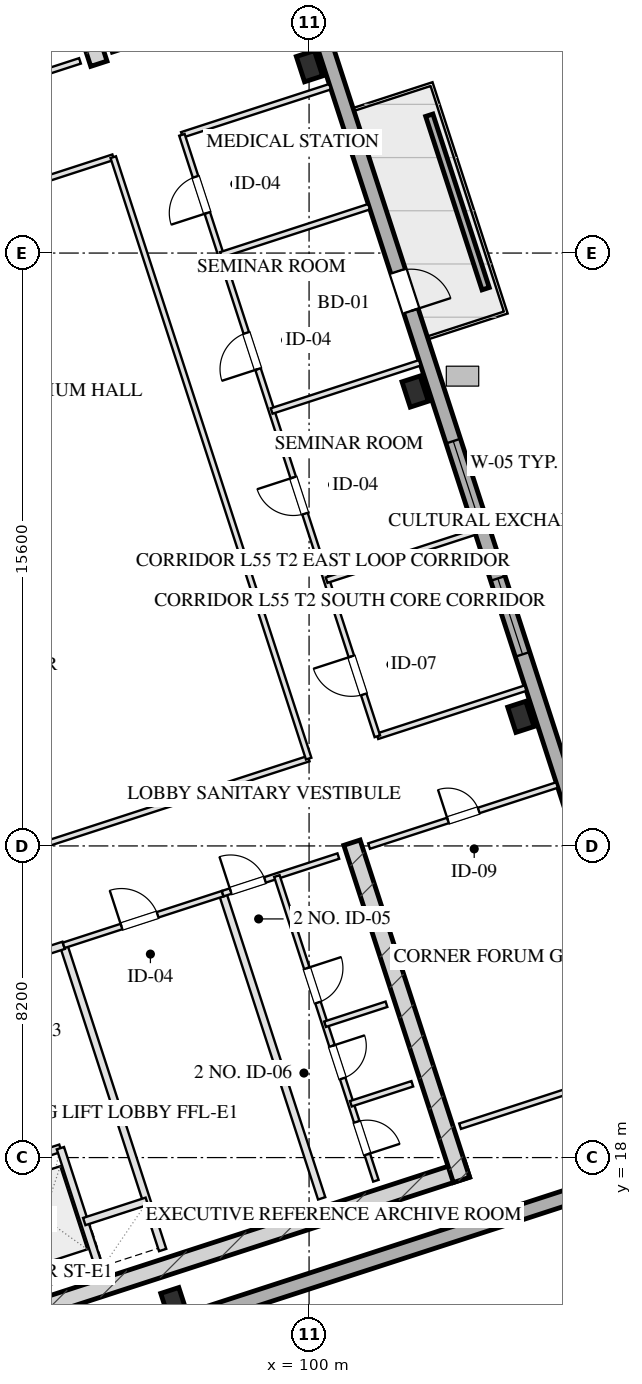
"""IFC4 building model, lengths in metres.
Left out: names, types, materials, properties, quantities, classifications, styles, units other than length and angle.
Written with IfcOpenShell. Run it as: python <this file> out.ifc"""

import sys

from ifc_helpers import new_model, si_unit, direction, frame, frame_2d, origin, origin_2d, place, context, subcontext, project, spatial, rectangle, hollow_rectangle, extrude, element, fill, save


model = new_model("IFC4")
c1 = context("Model", 3, precision=1e-05, world=origin(), true_north=direction((0.0, 1.0)))
c2 = subcontext(c1, "Body", "Model", "MODEL_VIEW")
j1 = project(units=[si_unit("LENGTHUNIT", "METRE"), si_unit("PLANEANGLEUNIT", "RADIAN")], contexts=[c1])
p1 = place(None, origin())
s1 = spatial("IfcSite", under=j1, at=p1, CompositionType="ELEMENT")
p2 = place(p1, origin())
s2 = spatial("IfcBuilding", under=s1, at=p2, CompositionType="ELEMENT")
p3 = place(p2, frame((0.0, 0.0, 205.85)))
s3 = spatial("IfcBuildingStorey", under=s2, at=p3, CompositionType="ELEMENT", Elevation=205.85)
p4 = place(p3, frame((88.701, 12.675, 0.0), z_axis=(0.0, 0.0, 1.0), x_axis=(0.95105824505, 0.309011673763, 0.0)))
e1 = element("IfcWall", 1, at=p4, inside=s3, PredefinedType="SHEAR", context=c2, shape_type="SweptSolid", body=[
    extrude(rectangle(XDim=16.25, YDim=0.45, at=frame_2d((8.125, 0.0))), origin(), (0.0, 0.0, 1.0), 3.45),
])
for number, where, z_axis, x_axis in (
    (2, (101.128, 26.286, 0.0), (0.0, 0.0, 1.0), (0.309, -0.951, 0.0)),
    (3, (94.469, 46.781, 0.0), (0.0, 0.0, 1.0), (-0.309, 0.951, 0.0)),
):
    element("IfcWall", number, at=place(p3, frame(where, z_axis=z_axis, x_axis=x_axis)), inside=s3, PredefinedType="SHEAR", context=c2, shape_type="SweptSolid", body=[
        extrude(rectangle(XDim=9.33, YDim=0.45, at=frame_2d((4.665, 0.0))), origin(), (0.0, 0.0, 1.0), 3.45),
    ])
for number, where, z_axis, x_axis in (
    (4, (105.573, 29.597, 0.0), (0.0, 0.0, 1.0), (0.951, 0.309, 0.0)),
    (5, (102.792, 38.156, 0.0), (0.0, 0.0, 1.0), (0.951, 0.309, 0.0)),
    (6, (100.01, 46.716, 0.0), (0.0, 0.0, 1.0), (0.951, 0.309, 0.0)),
    (7, (96.443, 14.17, 0.0), (0.0, 0.0, 1.0), (0.951, 0.309, 0.0)),
):
    element("IfcColumn", number, at=place(p3, frame(where, z_axis=z_axis, x_axis=x_axis)), inside=s3, PredefinedType="COLUMN", context=c2, shape_type="SweptSolid", body=[
        extrude(hollow_rectangle(XDim=0.5, YDim=0.7, WallThickness=0.025, at=origin_2d()), origin(), (0.0, 0.0, 1.0), 3.451),
    ])
p5 = place(p3, frame((97.382, 56.586, 0.0), z_axis=(0.0, 0.0, 1.0), x_axis=(0.309016491071, -0.951056679828, 0.0)))
e8 = element("IfcWall", 8, at=p5, inside=s3, PredefinedType="SOLIDWALL", context=c2, shape_type="SweptSolid", body=[
    extrude(rectangle(XDim=38.4, YDim=0.4, at=frame_2d((19.2, 0.0))), origin(), (0.0, 0.0, 1.0), 2.61),
])
p6 = place(p5, frame((24.55, 0.0, 0.75)))
e9 = element("IfcOpeningElement", 9, at=p6, cuts=e8, PredefinedType="OPENING", context=c2, shape_type="SweptSolid", body=[
    extrude(rectangle(XDim=2.1, YDim=1.46, at=frame_2d((1.05, 0.73))), frame((0.0, 0.21, 0.0), z_axis=(0.0, -1.0, 0.0), x_axis=(1.0, 0.0, 0.0)), (0.0, 0.0, 1.0), 0.42),
])
p7 = place(p5, frame((20.75, 0.0, 0.75)))
e10 = element("IfcOpeningElement", 10, at=p7, cuts=e8, PredefinedType="OPENING", context=c2, shape_type="SweptSolid", body=[
    extrude(rectangle(XDim=2.1, YDim=1.46, at=frame_2d((1.05, 0.73))), frame((0.0, 0.21, 0.0), z_axis=(0.0, -1.0, 0.0), x_axis=(1.0, 0.0, 0.0)), (0.0, 0.0, 1.0), 0.42),
])
p8 = place(p5, frame((16.05, 0.0, 0.0)))
e11 = element("IfcOpeningElement", 11, at=p8, cuts=e8, PredefinedType="OPENING", context=c2, shape_type="SweptSolid", body=[
    extrude(rectangle(XDim=1.1, YDim=2.15, at=frame_2d((0.55, 1.075))), frame((0.0, 0.21, 0.0), z_axis=(0.0, -1.0, 0.0), x_axis=(1.0, 0.0, 0.0)), (0.0, 0.0, 1.0), 0.42),
])
p9 = place(p3, frame((107.835, 17.294, 0.0), z_axis=(0.0, 0.0, 1.0), x_axis=(-0.951058012937, -0.309012388148, 0.0)))
e12 = element("IfcWall", 12, at=p9, inside=s3, PredefinedType="SOLIDWALL", context=c2, shape_type="SweptSolid", body=[
    extrude(rectangle(XDim=23.6, YDim=0.4, at=frame_2d((11.8, 0.0))), origin(), (0.0, 0.0, 1.0), 2.61),
])
p10 = place(p3, frame((104.646, 40.862, 0.0), z_axis=(0.0, 0.0, 1.0), x_axis=(-0.309032019345, 0.951051634255, 0.0)))
e13 = element("IfcWall", 13, at=p10, inside=s3, PredefinedType="PARAPET", context=c2, shape_type="SweptSolid", body=[
    extrude(rectangle(XDim=4.8, YDim=0.2, at=frame_2d((2.4, 0.0))), origin(), (0.0, 0.0, 1.0), 0.75),
])
p11 = place(p3, frame((93.542, 23.585, 0.0), z_axis=(0.0, 0.0, 1.0), x_axis=(0.309042196757, -0.951048327176, 0.0)))
e14 = element("IfcWall", 14, at=p11, inside=s3, PredefinedType="PARTITIONING", context=c2, shape_type="SweptSolid", body=[
    extrude(rectangle(XDim=8.43, YDim=0.2, at=frame_2d((4.215, 0.0))), origin(), (0.0, 0.0, 1.0), 3.175),
])
p12 = place(p3, frame((89.899, 22.401, 0.0), z_axis=(0.0, 0.0, 1.0), x_axis=(0.951046716504, 0.309047153403, 0.0)))
e15 = element("IfcWall", 15, at=p12, inside=s3, PredefinedType="PARTITIONING", context=c2, shape_type="SweptSolid", body=[
    extrude(rectangle(XDim=3.83, YDim=0.2, at=frame_2d((1.915, 0.0))), origin(), (0.0, 0.0, 1.0), 3.175),
])
p13 = place(p12, frame((1.35, 0.0, 0.0)))
e16 = element("IfcOpeningElement", 16, at=p13, cuts=e15, PredefinedType="OPENING", context=c2, shape_type="SweptSolid", body=[
    extrude(rectangle(XDim=1.2, YDim=2.05, at=frame_2d((0.6, 1.025))), frame((0.0, 0.11, 0.0), z_axis=(0.0, -1.0, 0.0), x_axis=(1.0, 0.0, 0.0)), (0.0, 0.0, 1.0), 0.22),
])
p14 = place(p3, frame((91.46, 17.598, 0.0), z_axis=(0.0, 0.0, 1.0), x_axis=(0.951062257173, 0.308999325213, 0.0)))
e17 = element("IfcWall", 17, at=p14, inside=s3, PredefinedType="PARTITIONING", context=c2, shape_type="SweptSolid", body=[
    extrude(rectangle(XDim=2.1, YDim=0.2, at=frame_2d((1.05, 0.0))), origin(), (0.0, 0.0, 1.0), 3.175),
])
p15 = place(p14, frame((0.35, 0.0, 0.0)))
e18 = element("IfcOpeningElement", 18, at=p15, cuts=e17, PredefinedType="OPENING", context=c2, shape_type="SweptSolid", body=[
    extrude(rectangle(XDim=1.1, YDim=2.05, at=frame_2d((0.55, 1.025))), frame((0.0, 0.11, 0.0), z_axis=(0.0, -1.0, 0.0), x_axis=(1.0, 0.0, 0.0)), (0.0, 0.0, 1.0), 0.22),
])
p16 = place(p3, frame((93.457, 18.247, 0.0), z_axis=(0.0, 0.0, 1.0), x_axis=(0.3089935693, -0.951064127245, 0.0)))
e19 = element("IfcWall", 19, at=p16, inside=s3, PredefinedType="PARTITIONING", context=c2, shape_type="SweptSolid", body=[
    extrude(rectangle(XDim=3.7, YDim=0.2, at=frame_2d((1.85, 0.0))), origin(), (0.0, 0.0, 1.0), 3.175),
])
p17 = place(p3, frame((94.084, 16.317, 0.0), z_axis=(0.0, 0.0, 1.0), x_axis=(0.951041328149, 0.309063734775, 0.0)))
e20 = element("IfcWall", 20, at=p17, inside=s3, PredefinedType="PARTITIONING", context=c2, shape_type="SweptSolid", body=[
    extrude(rectangle(XDim=1.73, YDim=0.2, at=frame_2d((0.865, 0.0))), origin(), (0.0, 0.0, 1.0), 3.175),
])
p18 = place(p3, frame((97.727, 24.944, 0.0), z_axis=(0.0, 0.0, 1.0), x_axis=(0.309016001439, -0.951056838919, 0.0)))
e21 = element("IfcWall", 21, at=p18, inside=s3, PredefinedType="PARTITIONING", context=c2, shape_type="SweptSolid", body=[
    extrude(rectangle(XDim=8.43, YDim=0.2, at=frame_2d((4.215, 0.0))), origin(), (0.0, 0.0, 1.0), 3.175),
])
p19 = place(p3, frame((93.542, 23.585, 0.0), z_axis=(0.0, 0.0, 1.0), x_axis=(0.951063829732, 0.308994485023, 0.0)))
e22 = element("IfcWall", 22, at=p19, inside=s3, PredefinedType="PARTITIONING", context=c2, shape_type="SweptSolid", body=[
    extrude(rectangle(XDim=4.4, YDim=0.15, at=frame_2d((2.2, 0.0))), origin(), (0.0, 0.0, 1.0), 3.175),
])
p20 = place(p19, frame((1.6, 0.0, 0.0)))
e23 = element("IfcOpeningElement", 23, at=p20, cuts=e22, PredefinedType="OPENING", context=c2, shape_type="SweptSolid", body=[
    extrude(rectangle(XDim=1.0, YDim=2.05, at=frame_2d((0.5, 1.025))), frame((0.0, 0.085, 0.0), z_axis=(0.0, -1.0, 0.0), x_axis=(1.0, 0.0, 0.0)), (0.0, 0.0, 1.0), 0.17),
])
p21 = place(p3, frame((97.727, 24.944, 0.0), z_axis=(0.0, 0.0, 1.0), x_axis=(0.951036872128, 0.309077446369, 0.0)))
e24 = element("IfcWall", 24, at=p21, inside=s3, PredefinedType="PARTITIONING", context=c2, shape_type="SweptSolid", body=[
    extrude(rectangle(XDim=3.2, YDim=0.15, at=frame_2d((1.6, 0.0))), origin(), (0.0, 0.0, 1.0), 3.175),
])
p22 = place(p21, frame((0.22, 0.0, 0.0)))
e25 = element("IfcOpeningElement", 25, at=p22, cuts=e24, PredefinedType="OPENING", context=c2, shape_type="SweptSolid", body=[
    extrude(rectangle(XDim=0.95, YDim=2.05, at=frame_2d((0.475, 1.025))), frame((0.0, 0.085, 0.0), z_axis=(0.0, -1.0, 0.0), x_axis=(1.0, 0.0, 0.0)), (0.0, 0.0, 1.0), 0.17),
])
p23 = place(p3, frame((99.153, 25.408, 0.0), z_axis=(0.0, 0.0, 1.0), x_axis=(0.309016001439, -0.951056838919, 0.0)))
e26 = element("IfcWall", 26, at=p23, inside=s3, PredefinedType="PARTITIONING", context=c2, shape_type="SweptSolid", body=[
    extrude(rectangle(XDim=8.43, YDim=0.15, at=frame_2d((4.215, 0.0))), origin(), (0.0, 0.0, 1.0), 3.175),
])
p24 = place(p23, frame((2.55, 0.0, 0.0)))
e27 = element("IfcOpeningElement", 27, at=p24, cuts=e26, PredefinedType="OPENING", context=c2, shape_type="SweptSolid", body=[
    extrude(rectangle(XDim=0.95, YDim=2.05, at=frame_2d((0.475, 1.025))), frame((0.0, 0.085, 0.0), z_axis=(0.0, -1.0, 0.0), x_axis=(1.0, 0.0, 0.0)), (0.0, 0.0, 1.0), 0.17),
])
p25 = place(p23, frame((4.7, 0.0, 0.0)))
e28 = element("IfcOpeningElement", 28, at=p25, cuts=e26, PredefinedType="OPENING", context=c2, shape_type="SweptSolid", body=[
    extrude(rectangle(XDim=0.9, YDim=2.05, at=frame_2d((0.45, 1.025))), frame((0.0, 0.085, 0.0), z_axis=(0.0, -1.0, 0.0), x_axis=(1.0, 0.0, 0.0)), (0.0, 0.0, 1.0), 0.17),
])
p26 = place(p23, frame((6.8, 0.0, 0.0)))
e29 = element("IfcOpeningElement", 29, at=p26, cuts=e26, PredefinedType="OPENING", context=c2, shape_type="SweptSolid", body=[
    extrude(rectangle(XDim=0.9, YDim=2.05, at=frame_2d((0.45, 1.025))), frame((0.0, 0.085, 0.0), z_axis=(0.0, -1.0, 0.0), x_axis=(1.0, 0.0, 0.0)), (0.0, 0.0, 1.0), 0.17),
])
p27 = place(p3, frame((100.42, 21.509, 0.0), z_axis=(0.0, 0.0, 1.0), x_axis=(0.951040401051, 0.309066587596, 0.0)))
e30 = element("IfcWall", 30, at=p27, inside=s3, PredefinedType="PARTITIONING", context=c2, shape_type="SweptSolid", body=[
    extrude(rectangle(XDim=1.7, YDim=0.15, at=frame_2d((0.85, 0.0))), origin(), (0.0, 0.0, 1.0), 3.175),
])
p28 = place(p3, frame((101.1, 19.416, 0.0), z_axis=(0.0, 0.0, 1.0), x_axis=(0.951054116971, 0.309024378638, 0.0)))
e31 = element("IfcWall", 31, at=p28, inside=s3, PredefinedType="PARTITIONING", context=c2, shape_type="SweptSolid", body=[
    extrude(rectangle(XDim=1.7, YDim=0.15, at=frame_2d((0.85, 0.0))), origin(), (0.0, 0.0, 1.0), 3.175),
])
p29 = place(p3, frame((90.928, 45.868, 0.0), z_axis=(0.0, 0.0, 1.0), x_axis=(0.951059297078, 0.309008435874, 0.0)))
e32 = element("IfcWall", 32, at=p29, inside=s3, PredefinedType="PARTITIONING", context=c2, shape_type="SweptSolid", body=[
    extrude(rectangle(XDim=3.2, YDim=0.15, at=frame_2d((1.6, 0.0))), origin(), (0.0, 0.0, 1.0), 3.175),
])
p30 = place(p29, frame((0.45, 0.0, 0.0)))
e33 = element("IfcOpeningElement", 33, at=p30, cuts=e32, PredefinedType="OPENING", context=c2, shape_type="SweptSolid", body=[
    extrude(rectangle(XDim=0.95, YDim=2.05, at=frame_2d((0.475, 1.025))), frame((0.0, 0.085, 0.0), z_axis=(0.0, -1.0, 0.0), x_axis=(1.0, 0.0, 0.0)), (0.0, 0.0, 1.0), 0.17),
])
p31 = place(p3, frame((103.973, 18.825, 0.0), z_axis=(0.0, 0.0, 1.0), x_axis=(0.951055112834, 0.309021313752, 0.0)))
e34 = element("IfcWall", 34, at=p31, inside=s3, PredefinedType="PARTITIONING", context=c2, shape_type="SweptSolid", body=[
    extrude(rectangle(XDim=5.2, YDim=0.15, at=frame_2d((2.6, 0.0))), origin(), (0.0, 0.0, 1.0), 3.175),
])
p32 = place(p3, frame((101.578, 26.196, 0.0), z_axis=(0.0, 0.0, 1.0), x_axis=(0.951064427824, 0.308992644131, 0.0)))
e35 = element("IfcWall", 35, at=p32, inside=s3, PredefinedType="PARTITIONING", context=c2, shape_type="SweptSolid", body=[
    extrude(rectangle(XDim=5.2, YDim=0.15, at=frame_2d((2.6, 0.0))), origin(), (0.0, 0.0, 1.0), 3.175),
])
p33 = place(p32, frame((2.184, 0.0, 0.0)))
e36 = element("IfcOpeningElement", 36, at=p33, cuts=e35, PredefinedType="OPENING", context=c2, shape_type="SweptSolid", body=[
    extrude(rectangle(XDim=0.85, YDim=2.05, at=frame_2d((0.425, 1.025))), frame((0.0, 0.085, 0.0), z_axis=(0.0, -1.0, 0.0), x_axis=(1.0, 0.0, 0.0)), (0.0, 0.0, 1.0), 0.17),
])
p34 = place(p3, frame((94.78, 47.119, 0.0), z_axis=(0.0, 0.0, 1.0), x_axis=(0.951055112834, 0.309021313752, 0.0)))
e37 = element("IfcWall", 37, at=p34, inside=s3, PredefinedType="PARTITIONING", context=c2, shape_type="SweptSolid", body=[
    extrude(rectangle(XDim=5.2, YDim=0.15, at=frame_2d((2.6, 0.0))), origin(), (0.0, 0.0, 1.0), 3.175),
])
p35 = place(p34, frame((2.184, 0.0, 0.0)))
e38 = element("IfcOpeningElement", 38, at=p35, cuts=e37, PredefinedType="OPENING", context=c2, shape_type="SweptSolid", body=[
    extrude(rectangle(XDim=1.0, YDim=2.05, at=frame_2d((0.5, 1.025))), frame((0.0, 0.085, 0.0), z_axis=(0.0, -1.0, 0.0), x_axis=(1.0, 0.0, 0.0)), (0.0, 0.0, 1.0), 0.17),
])
p36 = place(p3, frame((91.097, 25.608, 0.0), z_axis=(0.0, 0.0, 1.0), x_axis=(0.951053063704, 0.309027620156, 0.0)))
e39 = element("IfcWall", 39, at=p36, inside=s3, PredefinedType="PARTITIONING", context=c2, shape_type="SweptSolid", body=[
    extrude(rectangle(XDim=9.35, YDim=0.15, at=frame_2d((4.675, 0.0))), origin(), (0.0, 0.0, 1.0), 3.175),
])
p37 = place(p3, frame((101.796, 29.085, 0.0), z_axis=(0.0, 0.0, 1.0), x_axis=(0.951061634685, 0.309001241148, 0.0)))
e40 = element("IfcWall", 40, at=p37, inside=s3, PredefinedType="PARTITIONING", context=c2, shape_type="SweptSolid", body=[
    extrude(rectangle(XDim=4.1, YDim=0.15, at=frame_2d((2.05, 0.0))), origin(), (0.0, 0.0, 1.0), 3.175),
])
p38 = place(p3, frame((85.955, 41.434, 0.0), z_axis=(0.0, 0.0, 1.0), x_axis=(0.951053063704, 0.309027620156, 0.0)))
e41 = element("IfcWall", 41, at=p38, inside=s3, PredefinedType="PARTITIONING", context=c2, shape_type="SweptSolid", body=[
    extrude(rectangle(XDim=9.35, YDim=0.15, at=frame_2d((4.675, 0.0))), origin(), (0.0, 0.0, 1.0), 3.175),
])
p39 = place(p3, frame((96.654, 44.91, 0.0), z_axis=(0.0, 0.0, 1.0), x_axis=(0.951044133184, 0.309055103076, 0.0)))
e42 = element("IfcWall", 42, at=p39, inside=s3, PredefinedType="PARTITIONING", context=c2, shape_type="SweptSolid", body=[
    extrude(rectangle(XDim=4.1, YDim=0.15, at=frame_2d((2.05, 0.0))), origin(), (0.0, 0.0, 1.0), 3.175),
])
p40 = place(p3, frame((99.989, 28.498, 0.0), z_axis=(0.0, 0.0, 1.0), x_axis=(-0.30901773025, 0.951056277195, 0.0)))
e43 = element("IfcWall", 43, at=p40, inside=s3, PredefinedType="PARTITIONING", context=c2, shape_type="SweptSolid", body=[
    extrude(rectangle(XDim=16.64, YDim=0.15, at=frame_2d((8.32, 0.0))), origin(), (0.0, 0.0, 1.0), 3.175),
])
p41 = place(p3, frame((101.796, 29.085, 0.0), z_axis=(0.0, 0.0, 1.0), x_axis=(-0.309022042254, 0.951054876125, 0.0)))
e44 = element("IfcWall", 44, at=p41, inside=s3, PredefinedType="PARTITIONING", context=c2, shape_type="SweptSolid", body=[
    extrude(rectangle(XDim=16.64, YDim=0.15, at=frame_2d((8.32, 0.0))), origin(), (0.0, 0.0, 1.0), 3.175),
])
p42 = place(p41, frame((1.16, 0.0, 0.0)))
e45 = element("IfcOpeningElement", 45, at=p42, cuts=e44, PredefinedType="OPENING", context=c2, shape_type="SweptSolid", body=[
    extrude(rectangle(XDim=1.05, YDim=2.05, at=frame_2d((0.525, 1.025))), frame((0.0, 0.085, 0.0), z_axis=(0.0, -1.0, 0.0), x_axis=(1.0, 0.0, 0.0)), (0.0, 0.0, 1.0), 0.17),
])
p43 = place(p41, frame((6.16, 0.0, 0.0)))
e46 = element("IfcOpeningElement", 46, at=p43, cuts=e44, PredefinedType="OPENING", context=c2, shape_type="SweptSolid", body=[
    extrude(rectangle(XDim=1.0, YDim=2.05, at=frame_2d((0.5, 1.025))), frame((0.0, 0.085, 0.0), z_axis=(0.0, -1.0, 0.0), x_axis=(1.0, 0.0, 0.0)), (0.0, 0.0, 1.0), 0.17),
])
p44 = place(p41, frame((10.16, 0.0, 0.0)))
e47 = element("IfcOpeningElement", 47, at=p44, cuts=e44, PredefinedType="OPENING", context=c2, shape_type="SweptSolid", body=[
    extrude(rectangle(XDim=1.0, YDim=2.05, at=frame_2d((0.5, 1.025))), frame((0.0, 0.085, 0.0), z_axis=(0.0, -1.0, 0.0), x_axis=(1.0, 0.0, 0.0)), (0.0, 0.0, 1.0), 0.17),
])
p45 = place(p41, frame((14.48, 0.0, 0.0)))
e48 = element("IfcOpeningElement", 48, at=p45, cuts=e44, PredefinedType="OPENING", context=c2, shape_type="SweptSolid", body=[
    extrude(rectangle(XDim=1.0, YDim=2.05, at=frame_2d((0.5, 1.025))), frame((0.0, 0.085, 0.0), z_axis=(0.0, -1.0, 0.0), x_axis=(1.0, 0.0, 0.0)), (0.0, 0.0, 1.0), 0.17),
])
p46 = place(p3, frame((100.461, 33.193, 0.0), z_axis=(0.0, 0.0, 1.0), x_axis=(0.951061634685, 0.309001241148, 0.0)))
e49 = element("IfcWall", 49, at=p46, inside=s3, PredefinedType="PARTITIONING", context=c2, shape_type="SweptSolid", body=[
    extrude(rectangle(XDim=4.1, YDim=0.15, at=frame_2d((2.05, 0.0))), origin(), (0.0, 0.0, 1.0), 3.175),
])
for number, where, z_axis, x_axis in (
    (50, (99.015, 37.644, 0.0), (0.0, 0.0, 1.0), (0.951, 0.309, 0.0)),
    (51, (97.68, 41.753, 0.0), (0.0, 0.0, 1.0), (0.951, 0.309, 0.0)),
):
    element("IfcWall", number, at=place(p3, frame(where, z_axis=z_axis, x_axis=x_axis)), inside=s3, PredefinedType="PARTITIONING", context=c2, shape_type="SweptSolid", body=[
        extrude(rectangle(XDim=4.1, YDim=0.15, at=frame_2d((2.05, 0.0))), origin(), (0.0, 0.0, 1.0), 3.175),
    ])
p47 = place(p6, origin())
e52 = element("IfcWindow", 52, at=p47, inside=s3, PartitioningType="TRIPLE_PANEL_VERTICAL", PredefinedType="WINDOW", context=c2, shape_type="SweptSolid", body=[
    extrude(rectangle(XDim=2.1, YDim=1.46, at=frame_2d((1.05, 0.73))), frame((0.0, 0.03, 0.0), z_axis=(0.0, -1.0, 0.0), x_axis=(1.0, 0.0, 0.0)), (0.0, 0.0, 1.0), 0.06),
])
fill(e9, e52)
p48 = place(p7, origin())
e53 = element("IfcWindow", 53, at=p48, inside=s3, PartitioningType="TRIPLE_PANEL_VERTICAL", PredefinedType="WINDOW", context=c2, shape_type="SweptSolid", body=[
    extrude(rectangle(XDim=2.1, YDim=1.46, at=frame_2d((1.05, 0.73))), frame((0.0, 0.03, 0.0), z_axis=(0.0, -1.0, 0.0), x_axis=(1.0, 0.0, 0.0)), (0.0, 0.0, 1.0), 0.06),
])
fill(e10, e53)
p49 = place(p8, origin())
e54 = element("IfcDoor", 54, at=p49, inside=s3, OperationType="SINGLE_SWING_RIGHT", PredefinedType="DOOR", context=c2, shape_type="SweptSolid", body=[
    extrude(rectangle(XDim=1.1, YDim=2.15, at=frame_2d((0.55, 1.075))), frame((0.0, 0.025, 0.0), z_axis=(0.0, -1.0, 0.0), x_axis=(1.0, 0.0, 0.0)), (0.0, 0.0, 1.0), 0.05),
])
fill(e11, e54)
p50 = place(p20, origin())
e55 = element("IfcDoor", 55, at=p50, inside=s3, OperationType="SINGLE_SWING_LEFT", PredefinedType="DOOR", context=c2, shape_type="SweptSolid", body=[
    extrude(rectangle(XDim=1.0, YDim=2.05, at=frame_2d((0.5, 1.025))), frame((0.0, 0.025, 0.0), z_axis=(0.0, -1.0, 0.0), x_axis=(1.0, 0.0, 0.0)), (0.0, 0.0, 1.0), 0.05),
])
fill(e23, e55)
p51 = place(p22, origin())
e56 = element("IfcDoor", 56, at=p51, inside=s3, OperationType="SINGLE_SWING_LEFT", PredefinedType="DOOR", context=c2, shape_type="SweptSolid", body=[
    extrude(rectangle(XDim=0.95, YDim=2.05, at=frame_2d((0.475, 1.025))), frame((0.0, 0.025, 0.0), z_axis=(0.0, -1.0, 0.0), x_axis=(1.0, 0.0, 0.0)), (0.0, 0.0, 1.0), 0.05),
])
fill(e25, e56)
p52 = place(p24, origin())
e57 = element("IfcDoor", 57, at=p52, inside=s3, OperationType="SINGLE_SWING_LEFT", PredefinedType="DOOR", context=c2, shape_type="SweptSolid", body=[
    extrude(rectangle(XDim=0.95, YDim=2.05, at=frame_2d((0.475, 1.025))), frame((0.0, 0.025, 0.0), z_axis=(0.0, -1.0, 0.0), x_axis=(1.0, 0.0, 0.0)), (0.0, 0.0, 1.0), 0.05),
])
fill(e27, e57)
p53 = place(p25, origin())
e58 = element("IfcDoor", 58, at=p53, inside=s3, OperationType="SINGLE_SWING_LEFT", PredefinedType="DOOR", context=c2, shape_type="SweptSolid", body=[
    extrude(rectangle(XDim=0.9, YDim=2.05, at=frame_2d((0.45, 1.025))), frame((0.0, 0.025, 0.0), z_axis=(0.0, -1.0, 0.0), x_axis=(1.0, 0.0, 0.0)), (0.0, 0.0, 1.0), 0.05),
])
fill(e28, e58)
p54 = place(p26, origin())
e59 = element("IfcDoor", 59, at=p54, inside=s3, OperationType="SINGLE_SWING_RIGHT", PredefinedType="DOOR", context=c2, shape_type="SweptSolid", body=[
    extrude(rectangle(XDim=0.9, YDim=2.05, at=frame_2d((0.45, 1.025))), frame((0.0, 0.025, 0.0), z_axis=(0.0, -1.0, 0.0), x_axis=(1.0, 0.0, 0.0)), (0.0, 0.0, 1.0), 0.05),
])
fill(e29, e59)
p55 = place(p33, origin())
e60 = element("IfcDoor", 60, at=p55, inside=s3, OperationType="SINGLE_SWING_LEFT", PredefinedType="DOOR", context=c2, shape_type="SweptSolid", body=[
    extrude(rectangle(XDim=0.85, YDim=2.05, at=frame_2d((0.425, 1.025))), frame((0.0, 0.025, 0.0), z_axis=(0.0, -1.0, 0.0), x_axis=(1.0, 0.0, 0.0)), (0.0, 0.0, 1.0), 0.05),
])
fill(e36, e60)
p56 = place(p42, origin())
e61 = element("IfcDoor", 61, at=p56, inside=s3, OperationType="SINGLE_SWING_RIGHT", PredefinedType="DOOR", context=c2, shape_type="SweptSolid", body=[
    extrude(rectangle(XDim=1.05, YDim=2.05, at=frame_2d((0.525, 1.025))), frame((0.0, 0.025, 0.0), z_axis=(0.0, -1.0, 0.0), x_axis=(1.0, 0.0, 0.0)), (0.0, 0.0, 1.0), 0.05),
])
fill(e45, e61)
p57 = place(p43, origin())
e62 = element("IfcDoor", 62, at=p57, inside=s3, OperationType="SINGLE_SWING_RIGHT", PredefinedType="DOOR", context=c2, shape_type="SweptSolid", body=[
    extrude(rectangle(XDim=1.0, YDim=2.05, at=frame_2d((0.5, 1.025))), frame((0.0, 0.025, 0.0), z_axis=(0.0, -1.0, 0.0), x_axis=(1.0, 0.0, 0.0)), (0.0, 0.0, 1.0), 0.05),
])
fill(e46, e62)
p58 = place(p44, origin())
e63 = element("IfcDoor", 63, at=p58, inside=s3, OperationType="SINGLE_SWING_LEFT", PredefinedType="DOOR", context=c2, shape_type="SweptSolid", body=[
    extrude(rectangle(XDim=1.0, YDim=2.05, at=frame_2d((0.5, 1.025))), frame((0.0, 0.025, 0.0), z_axis=(0.0, -1.0, 0.0), x_axis=(1.0, 0.0, 0.0)), (0.0, 0.0, 1.0), 0.05),
])
fill(e47, e63)
p59 = place(p45, origin())
e64 = element("IfcDoor", 64, at=p59, inside=s3, OperationType="SINGLE_SWING_LEFT", PredefinedType="DOOR", context=c2, shape_type="SweptSolid", body=[
    extrude(rectangle(XDim=1.0, YDim=2.05, at=frame_2d((0.5, 1.025))), frame((0.0, 0.025, 0.0), z_axis=(0.0, -1.0, 0.0), x_axis=(1.0, 0.0, 0.0)), (0.0, 0.0, 1.0), 0.05),
])
fill(e48, e64)
save(model, sys.argv[1])
